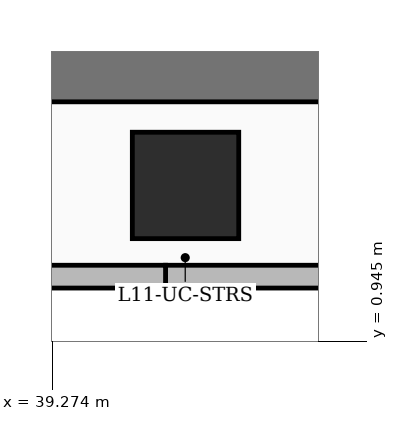
"""IFC4 building model, lengths in metres.
Left out: names, types, materials, properties, quantities, classifications, styles, units other than length and angle.
Written with IfcOpenShell. Run it as: python <this file> out.ifc"""

import sys

from ifc_helpers import new_model, si_unit, direction, frame, frame_2d, origin, origin_2d, place, context, subcontext, project, spatial, rectangle, extrude, element, save


model = new_model("IFC4")
c1 = context("Model", 3, precision=1e-05, world=origin(), true_north=direction((0.0, 1.0)))
c2 = subcontext(c1, "Body", "Model", "MODEL_VIEW")
j1 = project(units=[si_unit("LENGTHUNIT", "METRE"), si_unit("PLANEANGLEUNIT", "RADIAN")], contexts=[c1])
p1 = place(None, origin())
s1 = spatial("IfcSite", under=j1, at=p1, CompositionType="ELEMENT")
p2 = place(p1, origin())
s2 = spatial("IfcBuilding", under=s1, at=p2, CompositionType="ELEMENT")
p3 = place(p2, frame((0.0, 0.0, 49.8)))
s3 = spatial("IfcBuildingStorey", under=s2, at=p3, CompositionType="ELEMENT", Elevation=49.8)
p4 = place(p3, frame((35.85, 4.55, 0.0), z_axis=(0.0, 0.0, 1.0), x_axis=(1.0, 0.0, 0.0)))
e1 = element("IfcWall", 1, at=p4, inside=s3, PredefinedType="SHEAR", context=c2, shape_type="SweptSolid", body=[
    extrude(rectangle(XDim=10.5, YDim=0.9, at=frame_2d((5.25, 0.0))), origin(), (0.0, 0.0, 1.0), 3.6),
])
p5 = place(p3, frame((41.024, 3.0, 0.0), z_axis=(0.0, 0.0, 1.0), x_axis=(1.0, 0.0, 0.0)))
e2 = element("IfcColumn", 2, at=p5, inside=s3, PredefinedType="COLUMN", context=c2, shape_type="SweptSolid", body=[
    extrude(rectangle(XDim=1.4, YDim=1.4, at=origin_2d()), origin(), (0.0, 0.0, 1.0), 3.6),
])
p6 = place(p3, frame((47.954, 1.8, 0.0), z_axis=(0.0, 0.0, 1.0), x_axis=(-1.0, 0.0, 0.0)))
e3 = element("IfcWall", 3, at=p6, inside=s3, PredefinedType="SOLIDWALL", context=c2, shape_type="SweptSolid", body=[
    extrude(rectangle(XDim=7.193, YDim=0.3, at=frame_2d((3.597, 0.0))), origin(), (0.0, 0.0, 1.0), 3.35),
])
p7 = place(p6, frame((3.8, 0.0, 0.8)))
e4 = element("IfcOpeningElement", 4, at=p7, cuts=e3, PredefinedType="OPENING", context=c2, shape_type="SweptSolid", body=[
    extrude(rectangle(XDim=1.2, YDim=1.8, at=frame_2d((0.6, 0.9))), frame((0.0, 0.16, 0.0), z_axis=(0.0, -1.0, 0.0), x_axis=(1.0, 0.0, 0.0)), (0.0, 0.0, 1.0), 0.32),
])
p8 = place(p6, frame((1.175, 0.0, 0.8)))
e5 = element("IfcOpeningElement", 5, at=p8, cuts=e3, PredefinedType="OPENING", context=c2, shape_type="SweptSolid", body=[
    extrude(rectangle(XDim=1.2, YDim=1.8, at=frame_2d((0.6, 0.9))), frame((0.0, 0.16, 0.0), z_axis=(0.0, -1.0, 0.0), x_axis=(1.0, 0.0, 0.0)), (0.0, 0.0, 1.0), 0.32),
])
p9 = place(p3, frame((40.761, 1.8, 0.0), z_axis=(0.0, 0.0, 1.0), x_axis=(-1.0, 0.0, 0.0)))
e6 = element("IfcWall", 6, at=p9, inside=s3, PredefinedType="SOLIDWALL", context=c2, shape_type="SweptSolid", body=[
    extrude(rectangle(XDim=7.193, YDim=0.3, at=frame_2d((3.596, 0.0))), origin(), (0.0, 0.0, 1.0), 3.35),
])
p10 = place(p9, frame((2.45, 0.0, 0.6)))
e7 = element("IfcOpeningElement", 7, at=p10, cuts=e6, PredefinedType="OPENING", context=c2, shape_type="SweptSolid", body=[
    extrude(rectangle(XDim=2.4, YDim=2.1, at=frame_2d((1.2, 1.05))), frame((0.0, 0.16, 0.0), z_axis=(0.0, -1.0, 0.0), x_axis=(1.0, 0.0, 0.0)), (0.0, 0.0, 1.0), 0.32),
])
save(model, sys.argv[1])
